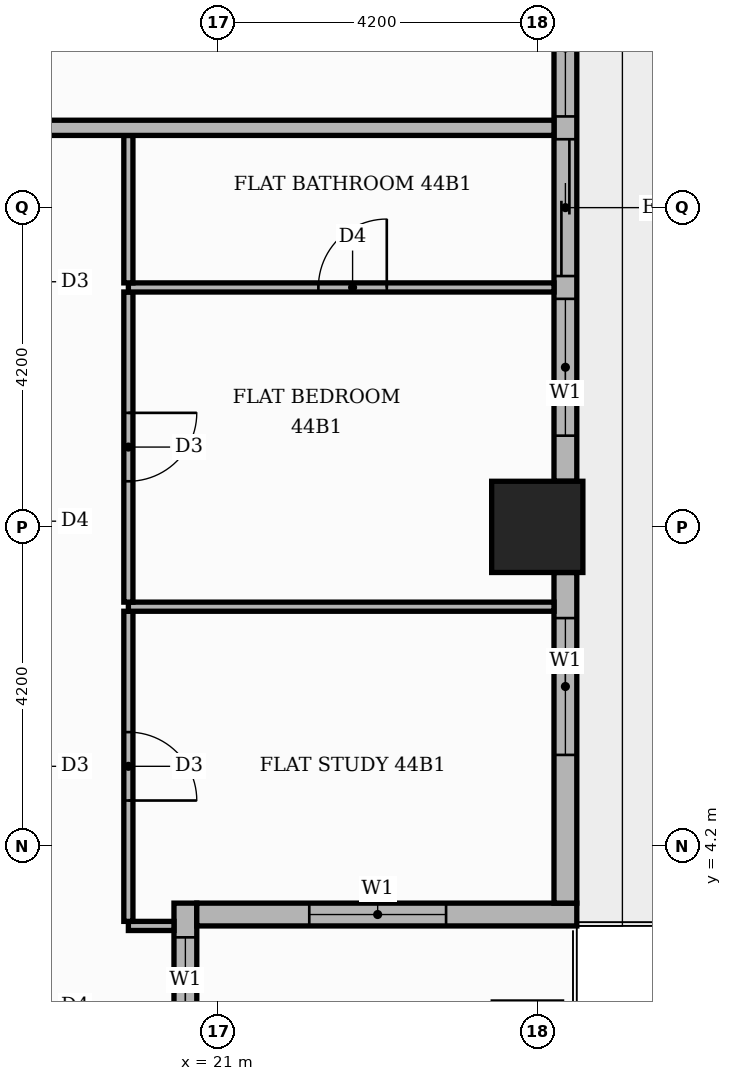
"""IFC4 building model, lengths in metres.
Left out: names, types, materials, properties, quantities, classifications, styles, units other than length and angle.
Written with IfcOpenShell. Run it as: python <this file> out.ifc"""

import sys

from ifc_helpers import new_model, si_unit, direction, frame, frame_2d, origin, origin_2d, place, context, subcontext, project, spatial, rectangle, extrude, element, fill, save


model = new_model("IFC4")
c1 = context("Model", 3, precision=1e-05, world=origin(), true_north=direction((0.0, 1.0)))
c2 = subcontext(c1, "Body", "Model", "MODEL_VIEW")
j1 = project(units=[si_unit("LENGTHUNIT", "METRE"), si_unit("PLANEANGLEUNIT", "RADIAN")], contexts=[c1])
p1 = place(None, origin())
s1 = spatial("IfcSite", under=j1, at=p1, CompositionType="ELEMENT")
p2 = place(p1, origin())
s2 = spatial("IfcBuilding", under=s1, at=p2, CompositionType="ELEMENT")
p3 = place(p2, frame((0.0, 0.0, 188.4)))
s3 = spatial("IfcBuildingStorey", under=s2, at=p3, CompositionType="ELEMENT", Elevation=188.4)
p4 = place(p3, frame((25.2, 8.4, 0.0), z_axis=(0.0, 0.0, 1.0), x_axis=(1.0, 0.0, 0.0)))
e1 = element("IfcColumn", 1, at=p4, inside=s3, PredefinedType="COLUMN", context=c2, shape_type="SweptSolid", body=[
    extrude(rectangle(XDim=1.2, YDim=1.2, at=origin_2d()), origin(), (0.0, 0.0, 1.0), 3.9),
])
p5 = place(p3, frame((20.57, -3.15, 0.0), z_axis=(0.0, 0.0, 1.0), x_axis=(0.0, 1.0, 0.0)))
e2 = element("IfcWall", 2, at=p5, inside=s3, PredefinedType="STANDARD", context=c2, shape_type="SweptSolid", body=[
    extrude(rectangle(XDim=6.6, YDim=0.3, at=frame_2d((3.3, 0.0))), origin(), (0.0, 0.0, 1.0), 3.48),
])
p6 = place(p5, frame((0.15, 0.0, 0.9)))
e3 = element("IfcOpeningElement", 3, at=p6, cuts=e2, PredefinedType="OPENING", context=c2, shape_type="SweptSolid", body=[
    extrude(rectangle(XDim=1.8, YDim=2.1, at=frame_2d((0.9, 1.05))), frame((0.0, 0.16, 0.0), z_axis=(0.0, -1.0, 0.0), x_axis=(1.0, 0.0, 0.0)), (0.0, 0.0, 1.0), 0.32),
])
p7 = place(p5, frame((2.25, 0.0, 0.0)))
e4 = element("IfcOpeningElement", 4, at=p7, cuts=e2, PredefinedType="OPENING", context=c2, shape_type="SweptSolid", body=[
    extrude(rectangle(XDim=1.8, YDim=2.4, at=frame_2d((0.9, 1.2))), frame((0.0, 0.16, 0.0), z_axis=(0.0, -1.0, 0.0), x_axis=(1.0, 0.0, 0.0)), (0.0, 0.0, 1.0), 0.32),
])
p8 = place(p5, frame((4.35, 0.0, 0.9)))
e5 = element("IfcOpeningElement", 5, at=p8, cuts=e2, PredefinedType="OPENING", context=c2, shape_type="SweptSolid", body=[
    extrude(rectangle(XDim=1.8, YDim=2.1, at=frame_2d((0.9, 1.05))), frame((0.0, 0.16, 0.0), z_axis=(0.0, -1.0, 0.0), x_axis=(1.0, 0.0, 0.0)), (0.0, 0.0, 1.0), 0.32),
])
p9 = place(p3, frame((20.72, 3.3, 0.0), z_axis=(0.0, 0.0, 1.0), x_axis=(1.0, 0.0, 0.0)))
e6 = element("IfcWall", 6, at=p9, inside=s3, PredefinedType="STANDARD", context=c2, shape_type="SweptSolid", body=[
    extrude(rectangle(XDim=5.0, YDim=0.3, at=frame_2d((2.5, 0.0))), origin(), (0.0, 0.0, 1.0), 3.48),
])
p10 = place(p9, frame((1.48, 0.0, 0.9)))
e7 = element("IfcOpeningElement", 7, at=p10, cuts=e6, PredefinedType="OPENING", context=c2, shape_type="SweptSolid", body=[
    extrude(rectangle(XDim=1.8, YDim=2.1, at=frame_2d((0.9, 1.05))), frame((0.0, 0.16, 0.0), z_axis=(0.0, -1.0, 0.0), x_axis=(1.0, 0.0, 0.0)), (0.0, 0.0, 1.0), 0.32),
])
p11 = place(p3, frame((25.57, 3.45, 0.0), z_axis=(0.0, 0.0, 1.0), x_axis=(0.0, 1.0, 0.0)))
e8 = element("IfcWall", 8, at=p11, inside=s3, PredefinedType="STANDARD", context=c2, shape_type="SweptSolid", body=[
    extrude(rectangle(XDim=4.35, YDim=0.3, at=frame_2d((2.175, 0.0))), origin(), (0.0, 0.0, 1.0), 3.48),
])
p12 = place(p11, frame((1.95, 0.0, 0.9)))
e9 = element("IfcOpeningElement", 9, at=p12, cuts=e8, PredefinedType="OPENING", context=c2, shape_type="SweptSolid", body=[
    extrude(rectangle(XDim=1.8, YDim=2.1, at=frame_2d((0.9, 1.05))), frame((0.0, 0.16, 0.0), z_axis=(0.0, -1.0, 0.0), x_axis=(1.0, 0.0, 0.0)), (0.0, 0.0, 1.0), 0.32),
])
p13 = place(p3, frame((25.57, 9.0, 0.0), z_axis=(0.0, 0.0, 1.0), x_axis=(0.0, 1.0, 0.0)))
e10 = element("IfcWall", 10, at=p13, inside=s3, PredefinedType="STANDARD", context=c2, shape_type="SweptSolid", body=[
    extrude(rectangle(XDim=7.2, YDim=0.3, at=frame_2d((3.6, 0.0))), origin(), (0.0, 0.0, 1.0), 3.48),
])
p14 = place(p13, frame((0.6, 0.0, 0.9)))
e11 = element("IfcOpeningElement", 11, at=p14, cuts=e10, PredefinedType="OPENING", context=c2, shape_type="SweptSolid", body=[
    extrude(rectangle(XDim=1.8, YDim=2.1, at=frame_2d((0.9, 1.05))), frame((0.0, 0.16, 0.0), z_axis=(0.0, -1.0, 0.0), x_axis=(1.0, 0.0, 0.0)), (0.0, 0.0, 1.0), 0.32),
])
p15 = place(p13, frame((2.7, 0.0, 0.0)))
e12 = element("IfcOpeningElement", 12, at=p15, cuts=e10, PredefinedType="OPENING", context=c2, shape_type="SweptSolid", body=[
    extrude(rectangle(XDim=1.8, YDim=2.4, at=frame_2d((0.9, 1.2))), frame((0.0, 0.16, 0.0), z_axis=(0.0, -1.0, 0.0), x_axis=(1.0, 0.0, 0.0)), (0.0, 0.0, 1.0), 0.32),
])
p16 = place(p13, frame((4.8, 0.0, 0.9)))
e13 = element("IfcOpeningElement", 13, at=p16, cuts=e10, PredefinedType="OPENING", context=c2, shape_type="SweptSolid", body=[
    extrude(rectangle(XDim=1.8, YDim=2.1, at=frame_2d((0.9, 1.05))), frame((0.0, 0.16, 0.0), z_axis=(0.0, -1.0, 0.0), x_axis=(1.0, 0.0, 0.0)), (0.0, 0.0, 1.0), 0.32),
])
p17 = place(p3, frame((19.82, 3.15, 0.0), z_axis=(0.0, 0.0, 1.0), x_axis=(1.0, 0.0, 0.0)))
e14 = element("IfcWall", 14, at=p17, inside=s3, PredefinedType="PARTITIONING", context=c2, shape_type="SweptSolid", body=[
    extrude(rectangle(XDim=0.6, YDim=0.12, at=frame_2d((0.3, 0.0))), origin(), (0.0, 0.0, 1.0), 3.48),
])
p18 = place(p3, frame((19.82, 3.21, 0.0), z_axis=(0.0, 0.0, 1.0), x_axis=(0.0, 1.0, 0.0)))
e15 = element("IfcWall", 15, at=p18, inside=s3, PredefinedType="PARTITIONING", context=c2, shape_type="SweptSolid", body=[
    extrude(rectangle(XDim=4.08, YDim=0.12, at=frame_2d((2.04, 0.0))), origin(), (0.0, 0.0, 1.0), 3.48),
])
p19 = place(p18, frame((1.59, 0.0, 0.0)))
e16 = element("IfcOpeningElement", 16, at=p19, cuts=e15, PredefinedType="OPENING", context=c2, shape_type="SweptSolid", body=[
    extrude(rectangle(XDim=0.9, YDim=2.1, at=frame_2d((0.45, 1.05))), frame((0.0, 0.07, 0.0), z_axis=(0.0, -1.0, 0.0), x_axis=(1.0, 0.0, 0.0)), (0.0, 0.0, 1.0), 0.14),
])
p20 = place(p3, frame((19.82, 7.35, 0.0), z_axis=(0.0, 0.0, 1.0), x_axis=(1.0, 0.0, 0.0)))
e17 = element("IfcWall", 17, at=p20, inside=s3, PredefinedType="PARTITIONING", context=c2, shape_type="SweptSolid", body=[
    extrude(rectangle(XDim=5.6, YDim=0.12, at=frame_2d((2.8, 0.0))), origin(), (0.0, 0.0, 1.0), 3.48),
])
p21 = place(p3, frame((19.82, 7.41, 0.0), z_axis=(0.0, 0.0, 1.0), x_axis=(0.0, 1.0, 0.0)))
e18 = element("IfcWall", 18, at=p21, inside=s3, PredefinedType="PARTITIONING", context=c2, shape_type="SweptSolid", body=[
    extrude(rectangle(XDim=4.08, YDim=0.12, at=frame_2d((2.04, 0.0))), origin(), (0.0, 0.0, 1.0), 3.48),
])
p22 = place(p21, frame((1.59, 0.0, 0.0)))
e19 = element("IfcOpeningElement", 19, at=p22, cuts=e18, PredefinedType="OPENING", context=c2, shape_type="SweptSolid", body=[
    extrude(rectangle(XDim=0.9, YDim=2.1, at=frame_2d((0.45, 1.05))), frame((0.0, 0.07, 0.0), z_axis=(0.0, -1.0, 0.0), x_axis=(1.0, 0.0, 0.0)), (0.0, 0.0, 1.0), 0.14),
])
p23 = place(p3, frame((19.82, 11.55, 0.0), z_axis=(0.0, 0.0, 1.0), x_axis=(1.0, 0.0, 0.0)))
e20 = element("IfcWall", 20, at=p23, inside=s3, PredefinedType="PARTITIONING", context=c2, shape_type="SweptSolid", body=[
    extrude(rectangle(XDim=5.6, YDim=0.12, at=frame_2d((2.8, 0.0))), origin(), (0.0, 0.0, 1.0), 3.48),
])
p24 = place(p23, frame((2.5, 0.0, 0.0)))
e21 = element("IfcOpeningElement", 21, at=p24, cuts=e20, PredefinedType="OPENING", context=c2, shape_type="SweptSolid", body=[
    extrude(rectangle(XDim=0.9, YDim=2.1, at=frame_2d((0.45, 1.05))), frame((0.0, 0.07, 0.0), z_axis=(0.0, -1.0, 0.0), x_axis=(1.0, 0.0, 0.0)), (0.0, 0.0, 1.0), 0.14),
])
p25 = place(p3, frame((19.82, 11.61, 0.0), z_axis=(0.0, 0.0, 1.0), x_axis=(0.0, 1.0, 0.0)))
e22 = element("IfcWall", 22, at=p25, inside=s3, PredefinedType="PARTITIONING", context=c2, shape_type="SweptSolid", body=[
    extrude(rectangle(XDim=1.94, YDim=0.12, at=frame_2d((0.97, 0.0))), origin(), (0.0, 0.0, 1.0), 3.48),
])
p26 = place(p3, frame((-13.65, 13.65, 0.0), z_axis=(0.0, 0.0, 1.0), x_axis=(1.0, 0.0, 0.0)))
e23 = element("IfcWall", 23, at=p26, inside=s3, PredefinedType="PARTITIONING", context=c2, shape_type="SweptSolid", body=[
    extrude(rectangle(XDim=39.07, YDim=0.2, at=frame_2d((19.535, 0.0))), origin(), (0.0, 0.0, 1.0), 3.48),
])
p27 = place(p26, frame((24.65, 0.0, 0.0)))
e24 = element("IfcOpeningElement", 24, at=p27, cuts=e23, PredefinedType="OPENING", context=c2, shape_type="SweptSolid", body=[
    extrude(rectangle(XDim=1.1, YDim=2.4, at=frame_2d((0.55, 1.2))), frame((0.0, 0.11, 0.0), z_axis=(0.0, -1.0, 0.0), x_axis=(1.0, 0.0, 0.0)), (0.0, 0.0, 1.0), 0.22),
])
p28 = place(p26, frame((12.05, 0.0, 0.0)))
e25 = element("IfcOpeningElement", 25, at=p28, cuts=e23, PredefinedType="OPENING", context=c2, shape_type="SweptSolid", body=[
    extrude(rectangle(XDim=1.1, YDim=2.4, at=frame_2d((0.55, 1.2))), frame((0.0, 0.11, 0.0), z_axis=(0.0, -1.0, 0.0), x_axis=(1.0, 0.0, 0.0)), (0.0, 0.0, 1.0), 0.22),
])
p29 = place(p8, origin())
e26 = element("IfcWindow", 26, at=p29, inside=s3, PartitioningType="SINGLE_PANEL", PredefinedType="WINDOW", context=c2, shape_type="SweptSolid", body=[
    extrude(rectangle(XDim=1.8, YDim=2.1, at=frame_2d((0.9, 1.05))), frame((0.0, 0.03, 0.0), z_axis=(0.0, -1.0, 0.0), x_axis=(1.0, 0.0, 0.0)), (0.0, 0.0, 1.0), 0.06),
])
fill(e5, e26)
p30 = place(p10, origin())
e27 = element("IfcWindow", 27, at=p30, inside=s3, PartitioningType="SINGLE_PANEL", PredefinedType="WINDOW", context=c2, shape_type="SweptSolid", body=[
    extrude(rectangle(XDim=1.8, YDim=2.1, at=frame_2d((0.9, 1.05))), frame((0.0, 0.03, 0.0), z_axis=(0.0, -1.0, 0.0), x_axis=(1.0, 0.0, 0.0)), (0.0, 0.0, 1.0), 0.06),
])
fill(e7, e27)
p31 = place(p12, origin())
e28 = element("IfcWindow", 28, at=p31, inside=s3, PartitioningType="SINGLE_PANEL", PredefinedType="WINDOW", context=c2, shape_type="SweptSolid", body=[
    extrude(rectangle(XDim=1.8, YDim=2.1, at=frame_2d((0.9, 1.05))), frame((0.0, 0.03, 0.0), z_axis=(0.0, -1.0, 0.0), x_axis=(1.0, 0.0, 0.0)), (0.0, 0.0, 1.0), 0.06),
])
fill(e9, e28)
p32 = place(p14, origin())
e29 = element("IfcWindow", 29, at=p32, inside=s3, PartitioningType="SINGLE_PANEL", PredefinedType="WINDOW", context=c2, shape_type="SweptSolid", body=[
    extrude(rectangle(XDim=1.8, YDim=2.1, at=frame_2d((0.9, 1.05))), frame((0.0, 0.03, 0.0), z_axis=(0.0, -1.0, 0.0), x_axis=(1.0, 0.0, 0.0)), (0.0, 0.0, 1.0), 0.06),
])
fill(e11, e29)
p33 = place(p15, origin())
e30 = element("IfcDoor", 30, at=p33, inside=s3, OperationType="SLIDING_TO_RIGHT", PredefinedType="DOOR", context=c2, shape_type="SweptSolid", body=[
    extrude(rectangle(XDim=1.8, YDim=2.4, at=frame_2d((0.9, 1.2))), frame((0.0, 0.025, 0.0), z_axis=(0.0, -1.0, 0.0), x_axis=(1.0, 0.0, 0.0)), (0.0, 0.0, 1.0), 0.05),
])
fill(e12, e30)
p34 = place(p16, origin())
e31 = element("IfcWindow", 31, at=p34, inside=s3, PartitioningType="SINGLE_PANEL", PredefinedType="WINDOW", context=c2, shape_type="SweptSolid", body=[
    extrude(rectangle(XDim=1.8, YDim=2.1, at=frame_2d((0.9, 1.05))), frame((0.0, 0.03, 0.0), z_axis=(0.0, -1.0, 0.0), x_axis=(1.0, 0.0, 0.0)), (0.0, 0.0, 1.0), 0.06),
])
fill(e13, e31)
p35 = place(p19, frame((0.9, 0.0, 0.0), z_axis=(0.0, 0.0, 1.0), x_axis=(-1.0, 0.0, 0.0)))
e32 = element("IfcDoor", 32, at=p35, inside=s3, OperationType="SINGLE_SWING_LEFT", PredefinedType="DOOR", context=c2, shape_type="SweptSolid", body=[
    extrude(rectangle(XDim=0.9, YDim=2.1, at=frame_2d((0.45, 1.05))), frame((0.0, 0.025, 0.0), z_axis=(0.0, -1.0, 0.0), x_axis=(1.0, 0.0, 0.0)), (0.0, 0.0, 1.0), 0.05),
])
fill(e16, e32)
p36 = place(p22, frame((0.9, 0.0, 0.0), z_axis=(0.0, 0.0, 1.0), x_axis=(-1.0, 0.0, 0.0)))
e33 = element("IfcDoor", 33, at=p36, inside=s3, OperationType="SINGLE_SWING_RIGHT", PredefinedType="DOOR", context=c2, shape_type="SweptSolid", body=[
    extrude(rectangle(XDim=0.9, YDim=2.1, at=frame_2d((0.45, 1.05))), frame((0.0, 0.025, 0.0), z_axis=(0.0, -1.0, 0.0), x_axis=(1.0, 0.0, 0.0)), (0.0, 0.0, 1.0), 0.05),
])
fill(e19, e33)
p37 = place(p24, origin())
e34 = element("IfcDoor", 34, at=p37, inside=s3, OperationType="SINGLE_SWING_RIGHT", PredefinedType="DOOR", context=c2, shape_type="SweptSolid", body=[
    extrude(rectangle(XDim=0.9, YDim=2.1, at=frame_2d((0.45, 1.05))), frame((0.0, 0.025, 0.0), z_axis=(0.0, -1.0, 0.0), x_axis=(1.0, 0.0, 0.0)), (0.0, 0.0, 1.0), 0.05),
])
fill(e21, e34)
save(model, sys.argv[1])
